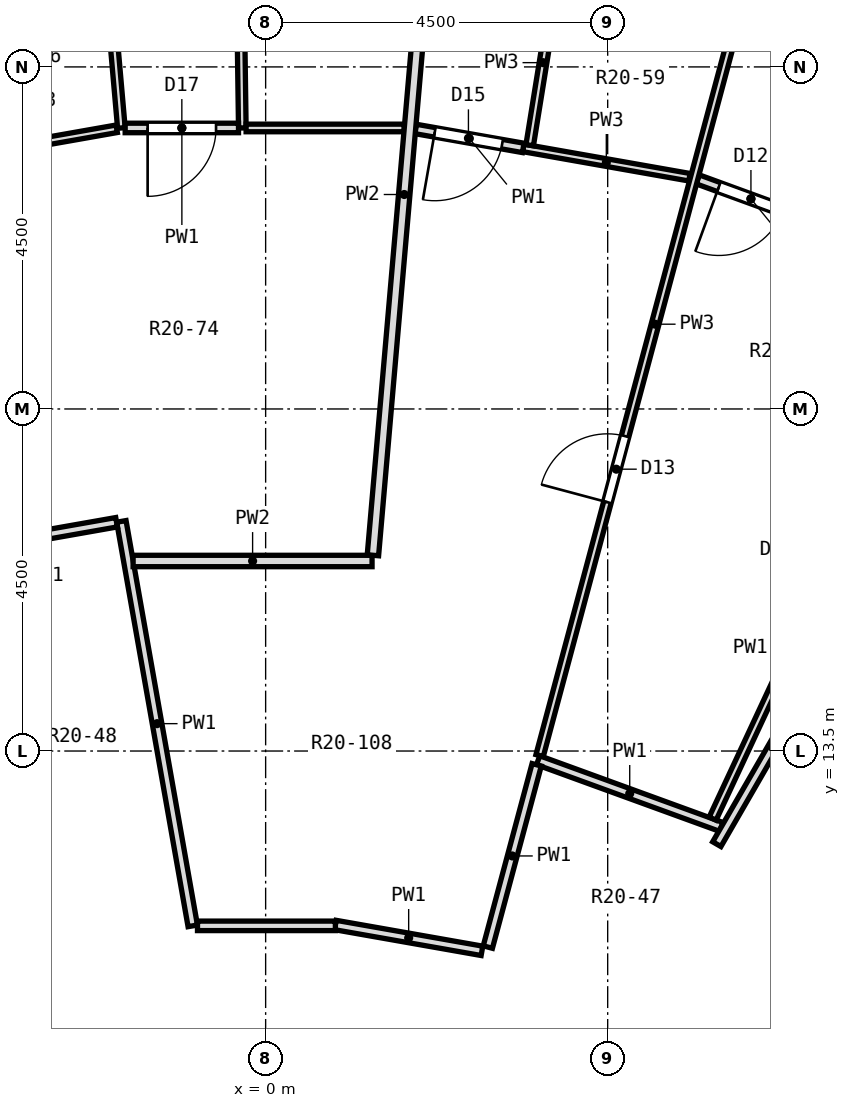
"""IFC4 building model, lengths in metres.
Left out: names, types, materials, properties, quantities, classifications, styles, units other than length and angle.
Written with IfcOpenShell. Run it as: python <this file> out.ifc"""

import sys

from ifc_helpers import new_model, si_unit, direction, frame, frame_2d, origin, place, context, subcontext, project, spatial, rectangle, extrude, element, fill, save


model = new_model("IFC4")
c1 = context("Model", 3, precision=1e-05, world=origin(), true_north=direction((0.0, 1.0)))
c2 = subcontext(c1, "Body", "Model", "MODEL_VIEW")
j1 = project(units=[si_unit("LENGTHUNIT", "METRE"), si_unit("PLANEANGLEUNIT", "RADIAN")], contexts=[c1])
p1 = place(None, origin())
s1 = spatial("IfcSite", under=j1, at=p1, CompositionType="ELEMENT")
p2 = place(p1, origin())
s2 = spatial("IfcBuilding", under=s1, at=p2, CompositionType="ELEMENT")
p3 = place(p2, frame((0.0, 0.0, 121.6)))
s3 = spatial("IfcBuildingStorey", under=s2, at=p3, CompositionType="ELEMENT", Elevation=121.6)
p4 = place(p3, frame((-0.339, 23.997, 0.0), z_axis=(0.0, 0.0, 1.0), x_axis=(0.014009876351, -0.999901856866, 0.0)))
e1 = element("IfcWall", 1, at=p4, inside=s3, PredefinedType="PARTITIONING", context=c2, shape_type="SweptSolid", body=[
    extrude(rectangle(XDim=2.3, YDim=0.1, at=frame_2d((1.15, 0.0))), origin(), (0.0, 0.0, 1.0), 2.8),
])
p5 = place(p3, frame((-2.237, 25.567, 0.0), z_axis=(0.0, 0.0, 1.0), x_axis=(0.087283097701, -0.996183547774, 0.0)))
e2 = element("IfcWall", 2, at=p5, inside=s3, PredefinedType="PARTITIONING", context=c2, shape_type="SweptSolid", body=[
    extrude(rectangle(XDim=3.885, YDim=0.1, at=frame_2d((1.943, 0.0))), origin(), (0.0, 0.0, 1.0), 2.8),
])
p6 = place(p3, frame((-1.898, 16.521, 0.0), z_axis=(0.0, 0.0, 1.0), x_axis=(0.173777601074, -0.984784923405, 0.0)))
e3 = element("IfcWall", 3, at=p6, inside=s3, PredefinedType="PARTITIONING", context=c2, shape_type="SweptSolid", body=[
    extrude(rectangle(XDim=5.403, YDim=0.125, at=frame_2d((2.702, 0.0))), origin(), (0.0, 0.0, 1.0), 2.8),
])
p7 = place(p3, frame((5.684, 21.021, 0.0), z_axis=(0.0, 0.0, 1.0), x_axis=(0.939314629693, -0.343056885143, 0.0)))
e4 = element("IfcWall", 4, at=p7, inside=s3, PredefinedType="PARTITIONING", context=c2, shape_type="SweptSolid", body=[
    extrude(rectangle(XDim=1.492, YDim=0.125, at=frame_2d((0.746, 0.0))), origin(), (0.0, 0.0, 1.0), 2.8),
])
p8 = place(p7, frame((0.296, 0.0, 0.0)))
e5 = element("IfcOpeningElement", 5, at=p8, cuts=e4, PredefinedType="OPENING", context=c2, shape_type="SweptSolid", body=[
    extrude(rectangle(XDim=0.9, YDim=2.1, at=frame_2d((0.45, 1.05))), frame((0.0, 0.074, 0.0), z_axis=(0.0, -1.0, 0.0), x_axis=(1.0, 0.0, 0.0)), (0.0, 0.0, 1.0), 0.149),
])
p9 = place(p3, frame((3.585, 13.379, 0.0), z_axis=(0.0, 0.0, 1.0), x_axis=(0.939651552045, -0.342132957691, 0.0)))
e6 = element("IfcWall", 6, at=p9, inside=s3, PredefinedType="PARTITIONING", context=c2, shape_type="SweptSolid", body=[
    extrude(rectangle(XDim=2.564, YDim=0.125, at=frame_2d((1.282, 0.0))), origin(), (0.0, 0.0, 1.0), 2.8),
])
p10 = place(p3, frame((0.917, 11.211, 0.0), z_axis=(0.0, 0.0, 1.0), x_axis=(0.984842502131, -0.173450990183, 0.0)))
e7 = element("IfcWall", 7, at=p10, inside=s3, PredefinedType="PARTITIONING", context=c2, shape_type="SweptSolid", body=[
    extrude(rectangle(XDim=1.958, YDim=0.125, at=frame_2d((0.979, 0.0))), origin(), (0.0, 0.0, 1.0), 2.8),
])
p11 = place(p3, frame((3.389, 21.435, 0.0), z_axis=(0.0, 0.0, 1.0), x_axis=(0.984795731746, -0.173716339864, 0.0)))
e8 = element("IfcWall", 8, at=p11, inside=s3, PredefinedType="PARTITIONING", context=c2, shape_type="SweptSolid", body=[
    extrude(rectangle(XDim=2.22, YDim=0.1, at=frame_2d((1.11, 0.0))), origin(), (0.0, 0.0, 1.0), 2.8),
])
p12 = place(p3, frame((1.972, 21.684, 0.0), z_axis=(0.0, 0.0, 1.0), x_axis=(0.984843298649, -0.173446467555, 0.0)))
e9 = element("IfcWall", 9, at=p12, inside=s3, PredefinedType="PARTITIONING", context=c2, shape_type="SweptSolid", body=[
    extrude(rectangle(XDim=1.438, YDim=0.125, at=frame_2d((0.719, 0.0))), origin(), (0.0, 0.0, 1.0), 2.8),
])
p13 = place(p12, frame((0.257, 0.0, 0.0)))
e10 = element("IfcOpeningElement", 10, at=p13, cuts=e9, PredefinedType="OPENING", context=c2, shape_type="SweptSolid", body=[
    extrude(rectangle(XDim=0.9, YDim=2.1, at=frame_2d((0.45, 1.05))), frame((0.0, 0.074, 0.0), z_axis=(0.0, -1.0, 0.0), x_axis=(1.0, 0.0, 0.0)), (0.0, 0.0, 1.0), 0.149),
])
p14 = place(p3, frame((-0.896, 11.2, 0.0), z_axis=(0.0, 0.0, 1.0), x_axis=(1.0, 0.0, 0.0)))
e11 = element("IfcWall", 11, at=p14, inside=s3, PredefinedType="PARTITIONING", context=c2, shape_type="SweptSolid", body=[
    extrude(rectangle(XDim=1.814, YDim=0.125, at=frame_2d((0.907, 0.0))), origin(), (0.0, 0.0, 1.0), 2.8),
])
p15 = place(p3, frame((-1.743, 16.0, 0.0), z_axis=(0.0, 0.0, 1.0), x_axis=(1.0, 0.0, 0.0)))
e12 = element("IfcWall", 12, at=p15, inside=s3, PredefinedType="PARTITIONING", context=c2, shape_type="SweptSolid", body=[
    extrude(rectangle(XDim=3.143, YDim=0.15, at=frame_2d((1.572, 0.0))), origin(), (0.0, 0.0, 1.0), 2.8),
])
p16 = place(p3, frame((-0.257, 21.697, 0.0), z_axis=(0.0, 0.0, 1.0), x_axis=(1.0, 0.0, 0.0)))
e13 = element("IfcWall", 13, at=p16, inside=s3, PredefinedType="PARTITIONING", context=c2, shape_type="SweptSolid", body=[
    extrude(rectangle(XDim=2.08, YDim=0.1, at=frame_2d((1.04, 0.0))), origin(), (0.0, 0.0, 1.0), 2.8),
])
p17 = place(p3, frame((-1.848, 21.697, 0.0), z_axis=(0.0, 0.0, 1.0), x_axis=(1.0, 0.0, 0.0)))
e14 = element("IfcWall", 14, at=p17, inside=s3, PredefinedType="PARTITIONING", context=c2, shape_type="SweptSolid", body=[
    extrude(rectangle(XDim=1.491, YDim=0.125, at=frame_2d((0.746, 0.0))), origin(), (0.0, 0.0, 1.0), 2.8),
])
p18 = place(p17, frame((0.295, 0.0, 0.0)))
e15 = element("IfcOpeningElement", 15, at=p18, cuts=e14, PredefinedType="OPENING", context=c2, shape_type="SweptSolid", body=[
    extrude(rectangle(XDim=0.9, YDim=2.1, at=frame_2d((0.45, 1.05))), frame((0.0, 0.074, 0.0), z_axis=(0.0, -1.0, 0.0), x_axis=(1.0, 0.0, 0.0)), (0.0, 0.0, 1.0), 0.149),
])
p19 = place(p3, frame((-3.805, 16.185, 0.0), z_axis=(0.0, 0.0, 1.0), x_axis=(0.984829460828, 0.173525021494, 0.0)))
e16 = element("IfcWall", 16, at=p19, inside=s3, PredefinedType="PARTITIONING", context=c2, shape_type="SweptSolid", body=[
    extrude(rectangle(XDim=1.873, YDim=0.125, at=frame_2d((0.936, 0.0))), origin(), (0.0, 0.0, 1.0), 2.8),
])
p20 = place(p3, frame((-4.021, 21.323, 0.0), z_axis=(0.0, 0.0, 1.0), x_axis=(0.984822285077, 0.173565742058, 0.0)))
e17 = element("IfcWall", 17, at=p20, inside=s3, PredefinedType="PARTITIONING", context=c2, shape_type="SweptSolid", body=[
    extrude(rectangle(XDim=2.093, YDim=0.1, at=frame_2d((1.046, 0.0))), origin(), (0.0, 0.0, 1.0), 2.8),
])
p21 = place(p3, frame((6.467, 9.197, 0.0), z_axis=(0.0, 0.0, 1.0), x_axis=(0.499744377638, 0.866172937132, 0.0)))
e18 = element("IfcWall", 18, at=p21, inside=s3, PredefinedType="PARTITIONING", context=c2, shape_type="SweptSolid", body=[
    extrude(rectangle(XDim=5.463, YDim=0.125, at=frame_2d((2.731, 0.0))), origin(), (0.0, 0.0, 1.0), 2.8),
])
p22 = place(p3, frame((5.936, 12.275, 0.0), z_axis=(0.0, 0.0, 1.0), x_axis=(0.499715257766, 0.866189737388, 0.0)))
e19 = element("IfcWall", 19, at=p22, inside=s3, PredefinedType="PARTITIONING", context=c2, shape_type="SweptSolid", body=[
    extrude(rectangle(XDim=2.937, YDim=0.125, at=frame_2d((1.469, 0.0))), origin(), (0.0, 0.0, 1.0), 2.8),
])
p23 = place(p3, frame((5.881, 12.611, 0.0), z_axis=(0.0, 0.0, 1.0), x_axis=(0.422604500324, 0.906314203964, 0.0)))
e20 = element("IfcWall", 20, at=p23, inside=s3, PredefinedType="PARTITIONING", context=c2, shape_type="SweptSolid", body=[
    extrude(rectangle(XDim=11.75, YDim=0.1, at=frame_2d((5.875, 0.0))), origin(), (0.0, 0.0, 1.0), 2.8),
])
p24 = place(p23, frame((3.45, 0.0, 0.0)))
e21 = element("IfcOpeningElement", 21, at=p24, cuts=e20, PredefinedType="OPENING", context=c2, shape_type="SweptSolid", body=[
    extrude(rectangle(XDim=0.9, YDim=2.1, at=frame_2d((0.45, 1.05))), frame((0.0, 0.062, 0.0), z_axis=(0.0, -1.0, 0.0), x_axis=(1.0, 0.0, 0.0)), (0.0, 0.0, 1.0), 0.124),
])
p25 = place(p3, frame((3.605, 13.44, 0.0), z_axis=(0.0, 0.0, 1.0), x_axis=(0.258538057112, 0.966001072994, 0.0)))
e22 = element("IfcWall", 22, at=p25, inside=s3, PredefinedType="PARTITIONING", context=c2, shape_type="SweptSolid", body=[
    extrude(rectangle(XDim=11.75, YDim=0.1, at=frame_2d((5.875, 0.0))), origin(), (0.0, 0.0, 1.0), 2.8),
])
p26 = place(p25, frame((3.45, 0.0, 0.0)))
e23 = element("IfcOpeningElement", 23, at=p26, cuts=e22, PredefinedType="OPENING", context=c2, shape_type="SweptSolid", body=[
    extrude(rectangle(XDim=0.9, YDim=2.1, at=frame_2d((0.45, 1.05))), frame((0.0, 0.062, 0.0), z_axis=(0.0, -1.0, 0.0), x_axis=(1.0, 0.0, 0.0)), (0.0, 0.0, 1.0), 0.124),
])
p27 = place(p3, frame((2.923, 10.921, 0.0), z_axis=(0.0, 0.0, 1.0), x_axis=(0.258837674225, 0.965920834438, 0.0)))
e24 = element("IfcWall", 24, at=p27, inside=s3, PredefinedType="PARTITIONING", context=c2, shape_type="SweptSolid", body=[
    extrude(rectangle(XDim=2.483, YDim=0.125, at=frame_2d((1.241, 0.0))), origin(), (0.0, 0.0, 1.0), 2.8),
])
p28 = place(p3, frame((3.474, 21.47, 0.0), z_axis=(0.0, 0.0, 1.0), x_axis=(0.159556862709, 0.987188739585, 0.0)))
e25 = element("IfcWall", 25, at=p28, inside=s3, PredefinedType="PARTITIONING", context=c2, shape_type="SweptSolid", body=[
    extrude(rectangle(XDim=2.2, YDim=0.1, at=frame_2d((1.1, 0.0))), origin(), (0.0, 0.0, 1.0), 2.8),
])
p29 = place(p3, frame((1.411, 16.075, 0.0), z_axis=(0.0, 0.0, 1.0), x_axis=(0.086480343505, 0.996253557177, 0.0)))
e26 = element("IfcWall", 26, at=p29, inside=s3, PredefinedType="PARTITIONING", context=c2, shape_type="SweptSolid", body=[
    extrude(rectangle(XDim=9.528, YDim=0.15, at=frame_2d((4.764, 0.0))), origin(), (0.0, 0.0, 1.0), 2.8),
])
p30 = place(p8, frame((0.9, 0.0, 0.0), z_axis=(0.0, 0.0, 1.0), x_axis=(-1.0, 0.0, 0.0)))
e27 = element("IfcDoor", 27, at=p30, inside=s3, OperationType="SINGLE_SWING_RIGHT", PredefinedType="DOOR", context=c2, shape_type="SweptSolid", body=[
    extrude(rectangle(XDim=0.9, YDim=2.1, at=frame_2d((0.45, 1.05))), frame((0.0, 0.025, 0.0), z_axis=(0.0, -1.0, 0.0), x_axis=(1.0, 0.0, 0.0)), (0.0, 0.0, 1.0), 0.05),
])
fill(e5, e27)
p31 = place(p26, origin())
e28 = element("IfcDoor", 28, at=p31, inside=s3, OperationType="SINGLE_SWING_LEFT", PredefinedType="DOOR", context=c2, shape_type="SweptSolid", body=[
    extrude(rectangle(XDim=0.9, YDim=2.1, at=frame_2d((0.45, 1.05))), frame((0.0, 0.025, 0.0), z_axis=(0.0, -1.0, 0.0), x_axis=(1.0, 0.0, 0.0)), (0.0, 0.0, 1.0), 0.05),
])
fill(e23, e28)
p32 = place(p13, frame((0.9, 0.0, 0.0), z_axis=(0.0, 0.0, 1.0), x_axis=(-1.0, 0.0, 0.0)))
e29 = element("IfcDoor", 29, at=p32, inside=s3, OperationType="SINGLE_SWING_RIGHT", PredefinedType="DOOR", context=c2, shape_type="SweptSolid", body=[
    extrude(rectangle(XDim=0.9, YDim=2.1, at=frame_2d((0.45, 1.05))), frame((0.0, 0.025, 0.0), z_axis=(0.0, -1.0, 0.0), x_axis=(1.0, 0.0, 0.0)), (0.0, 0.0, 1.0), 0.05),
])
fill(e10, e29)
p33 = place(p18, frame((0.9, 0.0, 0.0), z_axis=(0.0, 0.0, 1.0), x_axis=(-1.0, 0.0, 0.0)))
e30 = element("IfcDoor", 30, at=p33, inside=s3, OperationType="SINGLE_SWING_RIGHT", PredefinedType="DOOR", context=c2, shape_type="SweptSolid", body=[
    extrude(rectangle(XDim=0.9, YDim=2.1, at=frame_2d((0.45, 1.05))), frame((0.0, 0.025, 0.0), z_axis=(0.0, -1.0, 0.0), x_axis=(1.0, 0.0, 0.0)), (0.0, 0.0, 1.0), 0.05),
])
fill(e15, e30)
save(model, sys.argv[1])
